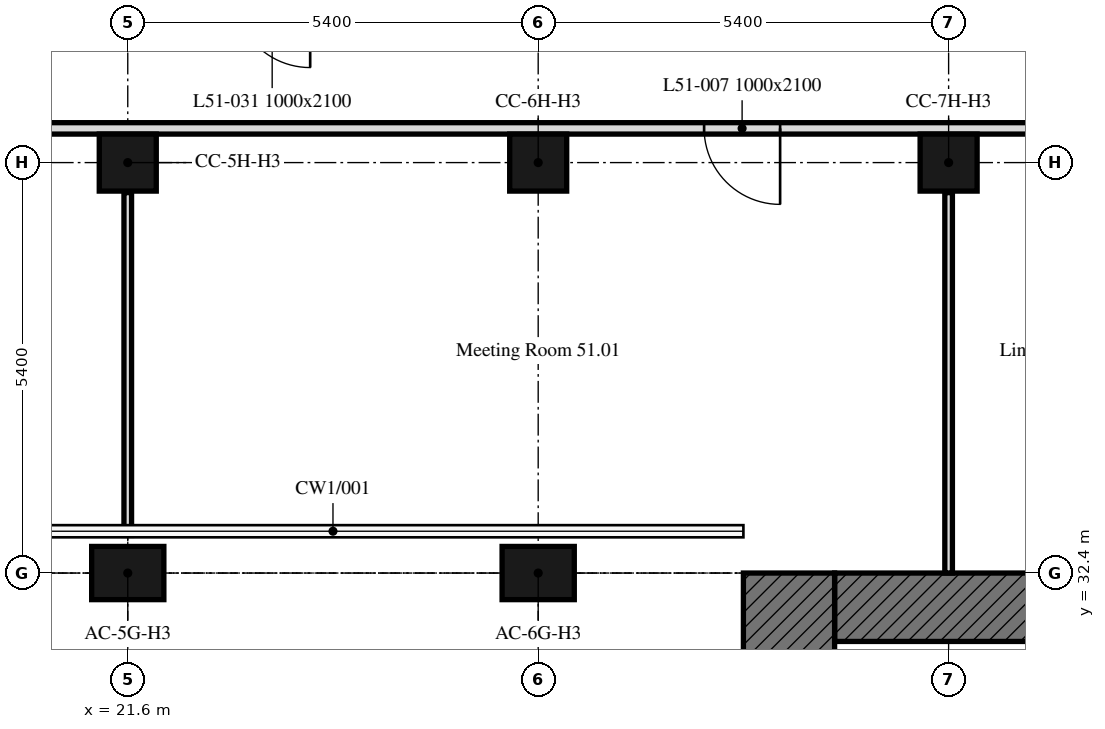
"""IFC4 building model, lengths in metres.
Left out: names, types, materials, properties, quantities, classifications, styles, units other than length and angle.
Written with IfcOpenShell. Run it as: python <this file> out.ifc"""

import sys

from ifc_helpers import new_model, si_unit, direction, frame, frame_2d, origin, origin_2d, place, context, subcontext, project, spatial, rectangle, extrude, element, fill, save


model = new_model("IFC4")
c1 = context("Model", 3, precision=1e-05, world=origin(), true_north=direction((0.0, 1.0)))
c2 = subcontext(c1, "Body", "Model", "MODEL_VIEW")
j1 = project(units=[si_unit("LENGTHUNIT", "METRE"), si_unit("PLANEANGLEUNIT", "RADIAN")], contexts=[c1])
p1 = place(None, origin())
s1 = spatial("IfcSite", under=j1, at=p1, CompositionType="ELEMENT")
p2 = place(p1, origin())
s2 = spatial("IfcBuilding", under=s1, at=p2, CompositionType="ELEMENT")
p3 = place(p2, frame((0.0, 0.0, 207.1)))
s3 = spatial("IfcBuildingStorey", under=s2, at=p3, CompositionType="ELEMENT", Elevation=207.1)
for number, where, z_axis, x_axis in (
    (1, (21.6, 32.4, 0.0), (0.0, 0.0, 1.0), (1.0, 0.0, 0.0)),
    (2, (27.0, 32.4, 0.0), (0.0, 0.0, 1.0), (1.0, 0.0, 0.0)),
):
    element("IfcColumn", number, at=place(p3, frame(where, z_axis=z_axis, x_axis=x_axis)), inside=s3, PredefinedType="COLUMN", context=c2, shape_type="SweptSolid", body=[
        extrude(rectangle(XDim=0.95, YDim=0.7, at=origin_2d()), origin(), (0.0, 0.0, 1.0), 3.0),
    ])
for number, where, z_axis, x_axis in (
    (3, (21.6, 37.8, 0.0), (0.0, 0.0, 1.0), (1.0, 0.0, 0.0)),
    (4, (27.0, 37.8, 0.0), (0.0, 0.0, 1.0), (1.0, 0.0, 0.0)),
    (5, (32.4, 37.8, 0.0), (0.0, 0.0, 1.0), (1.0, 0.0, 0.0)),
):
    element("IfcColumn", number, at=place(p3, frame(where, z_axis=z_axis, x_axis=x_axis)), inside=s3, PredefinedType="COLUMN", context=c2, shape_type="SweptSolid", body=[
        extrude(rectangle(XDim=0.75, YDim=0.75, at=origin_2d()), origin(), (0.0, 0.0, 1.0), 3.0),
    ])
p4 = place(p3, frame((30.9, 31.95, 0.0), z_axis=(0.0, 0.0, 1.0), x_axis=(1.0, 0.0, 0.0)))
e6 = element("IfcWall", 6, at=p4, inside=s3, PredefinedType="SOLIDWALL", context=c2, shape_type="SweptSolid", body=[
    extrude(rectangle(XDim=11.1, YDim=0.9, at=frame_2d((5.55, 0.0))), origin(), (0.0, 0.0, 1.0), 3.0),
])
p5 = place(p4, frame((5.55, 0.0, 0.0)))
e7 = element("IfcOpeningElement", 7, at=p5, cuts=e6, PredefinedType="OPENING", context=c2, shape_type="SweptSolid", body=[
    extrude(rectangle(XDim=2.0, YDim=2.4, at=frame_2d((1.0, 1.2))), frame((0.0, 0.45, 0.0), z_axis=(0.0, -1.0, 0.0), x_axis=(1.0, 0.0, 0.0)), (0.0, 0.0, 1.0), 0.9),
])
p6 = place(p3, frame((30.3, 16.2, 0.0), z_axis=(0.0, 0.0, 1.0), x_axis=(0.0, 1.0, 0.0)))
e8 = element("IfcWall", 8, at=p6, inside=s3, PredefinedType="SOLIDWALL", context=c2, shape_type="SweptSolid", body=[
    extrude(rectangle(XDim=16.2, YDim=1.2, at=frame_2d((8.1, 0.0))), origin(), (0.0, 0.0, 1.0), 3.0),
])
p7 = place(p3, frame((32.4, 32.4, 0.0), z_axis=(0.0, 0.0, 1.0), x_axis=(0.0, 1.0, 0.0)))
e9 = element("IfcWall", 9, at=p7, inside=s3, PredefinedType="PARTITIONING", context=c2, shape_type="SweptSolid", body=[
    extrude(rectangle(XDim=5.005, YDim=0.1, at=frame_2d((2.502, 0.0))), origin(), (0.0, 0.0, 1.0), 2.4),
])
p8 = place(p3, frame((21.6, 37.405, 0.0), z_axis=(0.0, 0.0, 1.0), x_axis=(0.0, -1.0, 0.0)))
e10 = element("IfcWall", 10, at=p8, inside=s3, PredefinedType="PARTITIONING", context=c2, shape_type="SweptSolid", body=[
    extrude(rectangle(XDim=4.51, YDim=0.1, at=frame_2d((2.255, 0.0))), origin(), (0.0, 0.0, 1.0), 2.4),
])
p9 = place(p3, frame((42.449, 38.25, 0.0), z_axis=(0.0, 0.0, 1.0), x_axis=(-1.0, 0.0, 0.0)))
e11 = element("IfcWall", 11, at=p9, inside=s3, PredefinedType="PARTITIONING", context=c2, shape_type="SweptSolid", body=[
    extrude(rectangle(XDim=37.049, YDim=0.15, at=frame_2d((18.524, 0.0))), origin(), (0.0, 0.0, 1.0), 2.4),
])
p10 = place(p9, frame((12.266, 0.0, 0.0)))
e12 = element("IfcOpeningElement", 12, at=p10, cuts=e11, PredefinedType="OPENING", context=c2, shape_type="SweptSolid", body=[
    extrude(rectangle(XDim=1.0, YDim=2.1, at=frame_2d((0.5, 1.05))), frame((0.0, 0.075, 0.0), z_axis=(0.0, -1.0, 0.0), x_axis=(1.0, 0.0, 0.0)), (0.0, 0.0, 1.0), 0.15),
])
p11 = place(p9, frame((23.049, 0.0, 0.0)))
e13 = element("IfcOpeningElement", 13, at=p11, cuts=e11, PredefinedType="OPENING", context=c2, shape_type="SweptSolid", body=[
    extrude(rectangle(XDim=1.0, YDim=2.1, at=frame_2d((0.5, 1.05))), frame((0.0, 0.075, 0.0), z_axis=(0.0, -1.0, 0.0), x_axis=(1.0, 0.0, 0.0)), (0.0, 0.0, 1.0), 0.15),
])
p12 = place(p9, frame((1.409, 0.0, 0.0)))
e14 = element("IfcOpeningElement", 14, at=p12, cuts=e11, PredefinedType="OPENING", context=c2, shape_type="SweptSolid", body=[
    extrude(rectangle(XDim=1.0, YDim=2.1, at=frame_2d((0.5, 1.05))), frame((0.0, 0.075, 0.0), z_axis=(0.0, -1.0, 0.0), x_axis=(1.0, 0.0, 0.0)), (0.0, 0.0, 1.0), 0.15),
])
p13 = place(p9, frame((28.199, 0.0, 0.0)))
e15 = element("IfcOpeningElement", 15, at=p13, cuts=e11, PredefinedType="OPENING", context=c2, shape_type="SweptSolid", body=[
    extrude(rectangle(XDim=1.0, YDim=2.1, at=frame_2d((0.5, 1.05))), frame((0.0, 0.075, 0.0), z_axis=(0.0, -1.0, 0.0), x_axis=(1.0, 0.0, 0.0)), (0.0, 0.0, 1.0), 0.15),
])
p14 = place(p9, frame((7.099, 0.0, 0.0)))
e16 = element("IfcOpeningElement", 16, at=p14, cuts=e11, PredefinedType="OPENING", context=c2, shape_type="SweptSolid", body=[
    extrude(rectangle(XDim=1.0, YDim=2.1, at=frame_2d((0.5, 1.05))), frame((0.0, 0.075, 0.0), z_axis=(0.0, -1.0, 0.0), x_axis=(1.0, 0.0, 0.0)), (0.0, 0.0, 1.0), 0.15),
])
p15 = place(p9, frame((5.629, 0.0, 0.0)))
e17 = element("IfcOpeningElement", 17, at=p15, cuts=e11, PredefinedType="OPENING", context=c2, shape_type="SweptSolid", body=[
    extrude(rectangle(XDim=1.0, YDim=2.1, at=frame_2d((0.5, 1.05))), frame((0.0, 0.075, 0.0), z_axis=(0.0, -1.0, 0.0), x_axis=(1.0, 0.0, 0.0)), (0.0, 0.0, 1.0), 0.15),
])
p16 = place(p9, frame((29.669, 0.0, 0.0)))
e18 = element("IfcOpeningElement", 18, at=p16, cuts=e11, PredefinedType="OPENING", context=c2, shape_type="SweptSolid", body=[
    extrude(rectangle(XDim=1.0, YDim=2.1, at=frame_2d((0.5, 1.05))), frame((0.0, 0.075, 0.0), z_axis=(0.0, -1.0, 0.0), x_axis=(1.0, 0.0, 0.0)), (0.0, 0.0, 1.0), 0.15),
])
p17 = place(p10, origin())
e19 = element("IfcDoor", 19, at=p17, inside=s3, OperationType="SINGLE_SWING_LEFT", PredefinedType="DOOR", context=c2, shape_type="SweptSolid", body=[
    extrude(rectangle(XDim=1.0, YDim=2.1, at=frame_2d((0.5, 1.05))), frame((0.0, 0.025, 0.0), z_axis=(0.0, -1.0, 0.0), x_axis=(1.0, 0.0, 0.0)), (0.0, 0.0, 1.0), 0.05),
])
fill(e12, e19)
save(model, sys.argv[1])
